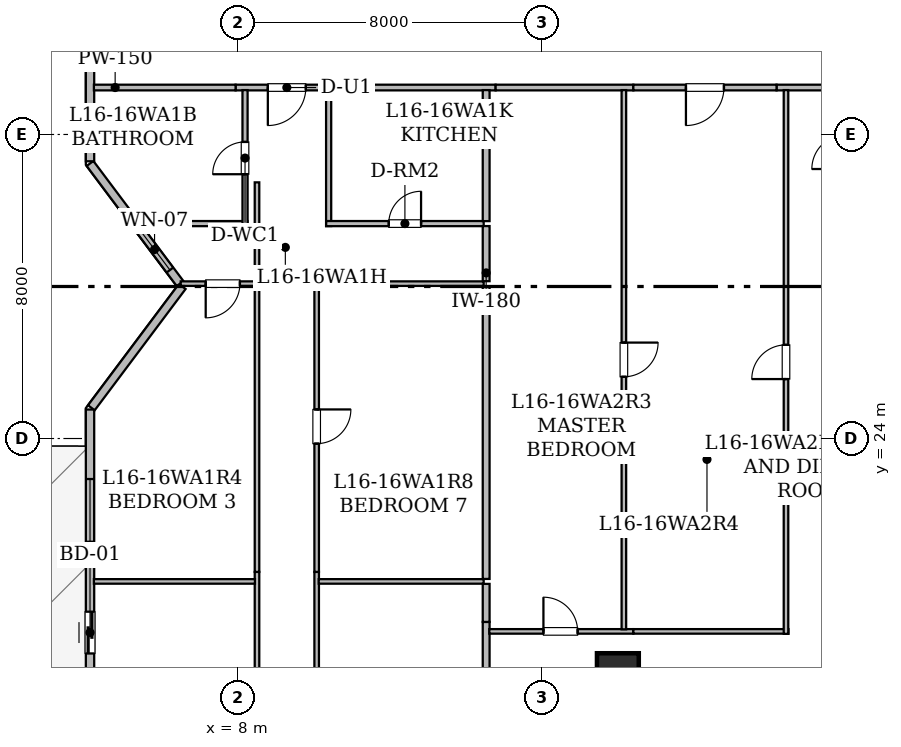
"""IFC4 building model, lengths in metres.
Left out: names, types, materials, properties, quantities, classifications, styles, units other than length and angle.
Written with IfcOpenShell. Run it as: python <this file> out.ifc"""

import sys

from ifc_helpers import new_model, si_unit, direction, frame, frame_2d, origin, origin_2d, place, context, subcontext, project, spatial, rectangle, hollow_rectangle, extrude, element, fill, save


model = new_model("IFC4")
c1 = context("Model", 3, precision=1e-05, world=origin(), true_north=direction((0.0, 1.0)))
c2 = subcontext(c1, "Body", "Model", "MODEL_VIEW")
j1 = project(units=[si_unit("LENGTHUNIT", "METRE"), si_unit("PLANEANGLEUNIT", "RADIAN")], contexts=[c1])
p1 = place(None, origin())
s1 = spatial("IfcSite", under=j1, at=p1, CompositionType="ELEMENT")
p2 = place(p1, origin())
s2 = spatial("IfcBuilding", under=s1, at=p2, CompositionType="ELEMENT")
p3 = place(p2, frame((0.0, 0.0, 66.15)))
s3 = spatial("IfcBuildingStorey", under=s2, at=p3, CompositionType="ELEMENT", Elevation=66.15)
p4 = place(p3, frame((18.0, 17.8, 0.0), z_axis=(0.0, 0.0, 1.0), x_axis=(1.0, 0.0, 0.0)))
e1 = element("IfcColumn", 1, at=p4, inside=s3, PredefinedType="COLUMN", context=c2, shape_type="SweptSolid", body=[
    extrude(hollow_rectangle(XDim=1.1, YDim=1.1, WallThickness=0.055, at=origin_2d()), origin(), (0.0, 0.0, 1.0), 3.65),
])
p5 = place(p3, frame((4.11, 7.317, 0.0), z_axis=(0.0, 0.0, 1.0), x_axis=(0.0, 1.0, 0.0)))
e2 = element("IfcWall", 2, at=p5, inside=s3, PredefinedType="STANDARD", context=c2, shape_type="SweptSolid", body=[
    extrude(rectangle(XDim=17.446, YDim=0.22, at=frame_2d((8.723, 0.0))), origin(), (0.0, 0.0, 1.0), 3.43),
])
p6 = place(p5, frame((11.027, 0.0, 0.0)))
e3 = element("IfcOpeningElement", 3, at=p6, cuts=e2, PredefinedType="OPENING", context=c2, shape_type="SweptSolid", body=[
    extrude(rectangle(XDim=1.1, YDim=2.2, at=frame_2d((0.55, 1.1))), frame((0.0, 0.12, 0.0), z_axis=(0.0, -1.0, 0.0), x_axis=(1.0, 0.0, 0.0)), (0.0, 0.0, 1.0), 0.24),
])
p7 = place(p5, frame((2.659, 0.0, 0.85)))
e4 = element("IfcOpeningElement", 4, at=p7, cuts=e2, PredefinedType="OPENING", context=c2, shape_type="SweptSolid", body=[
    extrude(rectangle(XDim=1.65, YDim=1.55, at=frame_2d((0.825, 0.775))), frame((0.0, 0.12, 0.0), z_axis=(0.0, -1.0, 0.0), x_axis=(1.0, 0.0, 0.0)), (0.0, 0.0, 1.0), 0.24),
])
p8 = place(p5, frame((13.967, 0.0, 0.85)))
e5 = element("IfcOpeningElement", 5, at=p8, cuts=e2, PredefinedType="OPENING", context=c2, shape_type="SweptSolid", body=[
    extrude(rectangle(XDim=1.65, YDim=1.55, at=frame_2d((0.825, 0.775))), frame((0.0, 0.12, 0.0), z_axis=(0.0, -1.0, 0.0), x_axis=(1.0, 0.0, 0.0)), (0.0, 0.0, 1.0), 0.24),
])
p9 = place(p3, frame((4.145, 24.809, 0.0), z_axis=(0.0, 0.0, 1.0), x_axis=(0.599823674734, 0.800132213592, 0.0)))
e6 = element("IfcWall", 6, at=p9, inside=s3, PredefinedType="STANDARD", context=c2, shape_type="SweptSolid", body=[
    extrude(rectangle(XDim=3.988, YDim=0.22, at=frame_2d((1.994, 0.0))), origin(), (0.0, 0.0, 1.0), 3.43),
])
p10 = place(p3, frame((6.48, 28.077, 0.0), z_axis=(0.0, 0.0, 1.0), x_axis=(-0.599960442794, 0.800029666377, 0.0)))
e7 = element("IfcWall", 7, at=p10, inside=s3, PredefinedType="STANDARD", context=c2, shape_type="SweptSolid", body=[
    extrude(rectangle(XDim=3.95, YDim=0.22, at=frame_2d((1.975, 0.0))), origin(), (0.0, 0.0, 1.0), 3.43),
])
p11 = place(p10, frame((0.445, 0.0, 0.85)))
e8 = element("IfcOpeningElement", 8, at=p11, cuts=e7, PredefinedType="OPENING", context=c2, shape_type="SweptSolid", body=[
    extrude(rectangle(XDim=1.35, YDim=1.5, at=frame_2d((0.675, 0.75))), frame((0.0, 0.12, 0.0), z_axis=(0.0, -1.0, 0.0), x_axis=(1.0, 0.0, 0.0)), (0.0, 0.0, 1.0), 0.24),
])
p12 = place(p3, frame((4.11, 31.295, 0.0), z_axis=(0.0, 0.0, 1.0), x_axis=(0.0, 1.0, 0.0)))
e9 = element("IfcWall", 9, at=p12, inside=s3, PredefinedType="STANDARD", context=c2, shape_type="SweptSolid", body=[
    extrude(rectangle(XDim=17.459, YDim=0.22, at=frame_2d((8.729, 0.0))), origin(), (0.0, 0.0, 1.0), 3.43),
])
p13 = place(p12, frame((8.165, 0.0, 0.85)))
e10 = element("IfcOpeningElement", 10, at=p13, cuts=e9, PredefinedType="OPENING", context=c2, shape_type="SweptSolid", body=[
    extrude(rectangle(XDim=1.65, YDim=1.55, at=frame_2d((0.825, 0.775))), frame((0.0, 0.12, 0.0), z_axis=(0.0, -1.0, 0.0), x_axis=(1.0, 0.0, 0.0)), (0.0, 0.0, 1.0), 0.24),
])
p14 = place(p12, frame((12.024, 0.0, 0.85)))
e11 = element("IfcOpeningElement", 11, at=p14, cuts=e9, PredefinedType="OPENING", context=c2, shape_type="SweptSolid", body=[
    extrude(rectangle(XDim=1.65, YDim=1.55, at=frame_2d((0.825, 0.775))), frame((0.0, 0.12, 0.0), z_axis=(0.0, -1.0, 0.0), x_axis=(1.0, 0.0, 0.0)), (0.0, 0.0, 1.0), 0.24),
])
p15 = place(p12, frame((15.921, 0.0, 0.85)))
e12 = element("IfcOpeningElement", 12, at=p15, cuts=e9, PredefinedType="OPENING", context=c2, shape_type="SweptSolid", body=[
    extrude(rectangle(XDim=1.35, YDim=1.5, at=frame_2d((0.675, 0.75))), frame((0.0, 0.12, 0.0), z_axis=(0.0, -1.0, 0.0), x_axis=(1.0, 0.0, 0.0)), (0.0, 0.0, 1.0), 0.24),
])
p16 = place(p3, frame((10.638, 33.235, 0.0), z_axis=(0.0, 0.0, 1.0), x_axis=(-1.0, 0.0, 0.0)))
e13 = element("IfcWall", 13, at=p16, inside=s3, PredefinedType="STANDARD", context=c2, shape_type="SweptSolid", body=[
    extrude(rectangle(XDim=2.698, YDim=0.15, at=frame_2d((1.349, 0.0))), origin(), (0.0, 0.0, 1.0), 3.43),
])
p17 = place(p16, frame((0.849, 0.0, 0.0)))
e14 = element("IfcOpeningElement", 14, at=p17, cuts=e13, PredefinedType="OPENING", context=c2, shape_type="SweptSolid", body=[
    extrude(rectangle(XDim=1.0, YDim=2.15, at=frame_2d((0.5, 1.075))), frame((0.0, 0.085, 0.0), z_axis=(0.0, -1.0, 0.0), x_axis=(1.0, 0.0, 0.0)), (0.0, 0.0, 1.0), 0.17),
])
p18 = place(p3, frame((7.94, 33.235, 0.0), z_axis=(0.0, 0.0, 1.0), x_axis=(-1.0, 0.0, 0.0)))
e15 = element("IfcWall", 15, at=p18, inside=s3, PredefinedType="STANDARD", context=c2, shape_type="SweptSolid", body=[
    extrude(rectangle(XDim=3.728, YDim=0.15, at=frame_2d((1.864, 0.0))), origin(), (0.0, 0.0, 1.0), 2.803),
])
p19 = place(p3, frame((14.783, 33.235, 0.0), z_axis=(0.0, 0.0, 1.0), x_axis=(-1.0, 0.0, 0.0)))
e16 = element("IfcWall", 16, at=p19, inside=s3, PredefinedType="STANDARD", context=c2, shape_type="SweptSolid", body=[
    extrude(rectangle(XDim=4.145, YDim=0.15, at=frame_2d((2.073, 0.0))), origin(), (0.0, 0.0, 1.0), 3.43),
])
p20 = place(p3, frame((23.755, 33.235, 0.0), z_axis=(0.0, 0.0, 1.0), x_axis=(-1.0, 0.0, 0.0)))
e17 = element("IfcWall", 17, at=p20, inside=s3, PredefinedType="STANDARD", context=c2, shape_type="SweptSolid", body=[
    extrude(rectangle(XDim=1.58, YDim=0.15, at=frame_2d((0.79, 0.0))), origin(), (0.0, 0.0, 1.0), 3.43),
])
p21 = place(p3, frame((18.407, 33.235, 0.0), z_axis=(0.0, 0.0, 1.0), x_axis=(-1.0, 0.0, 0.0)))
e18 = element("IfcWall", 18, at=p21, inside=s3, PredefinedType="STANDARD", context=c2, shape_type="SweptSolid", body=[
    extrude(rectangle(XDim=3.624, YDim=0.15, at=frame_2d((1.812, 0.0))), origin(), (0.0, 0.0, 1.0), 2.647),
])
p22 = place(p3, frame((22.175, 33.235, 0.0), z_axis=(0.0, 0.0, 1.0), x_axis=(-1.0, 0.0, 0.0)))
e19 = element("IfcWall", 19, at=p22, inside=s3, PredefinedType="STANDARD", context=c2, shape_type="SweptSolid", body=[
    extrude(rectangle(XDim=3.768, YDim=0.15, at=frame_2d((1.884, 0.0))), origin(), (0.0, 0.0, 1.0), 3.43),
])
p23 = place(p22, frame((1.384, 0.0, 0.0)))
e20 = element("IfcOpeningElement", 20, at=p23, cuts=e19, PredefinedType="OPENING", context=c2, shape_type="SweptSolid", body=[
    extrude(rectangle(XDim=1.0, YDim=2.15, at=frame_2d((0.5, 1.075))), frame((0.0, 0.085, 0.0), z_axis=(0.0, -1.0, 0.0), x_axis=(1.0, 0.0, 0.0)), (0.0, 0.0, 1.0), 0.17),
])
p24 = place(p3, frame((5.408, 29.655, 0.0), z_axis=(0.0, 0.0, 1.0), x_axis=(1.0, 0.0, 0.0)))
e21 = element("IfcWall", 21, at=p24, inside=s3, PredefinedType="PARTITIONING", context=c2, shape_type="SweptSolid", body=[
    extrude(rectangle(XDim=2.846, YDim=0.135, at=frame_2d((1.423, 0.0))), origin(), (0.0, 0.0, 1.0), 2.803),
])
p25 = place(p3, frame((8.189, 29.59, 0.0), z_axis=(0.0, 0.0, 1.0), x_axis=(0.0, 1.0, 0.0)))
e22 = element("IfcWall", 22, at=p25, inside=s3, PredefinedType="PARTITIONING", context=c2, shape_type="SweptSolid", body=[
    extrude(rectangle(XDim=3.578, YDim=0.135, at=frame_2d((1.789, 0.0))), origin(), (0.0, 0.0, 1.0), 3.43),
])
p26 = place(p25, frame((1.364, 0.0, 0.0)))
e23 = element("IfcOpeningElement", 23, at=p26, cuts=e22, PredefinedType="OPENING", context=c2, shape_type="SweptSolid", body=[
    extrude(rectangle(XDim=0.85, YDim=2.1, at=frame_2d((0.425, 1.05))), frame((0.0, 0.077, 0.0), z_axis=(0.0, -1.0, 0.0), x_axis=(1.0, 0.0, 0.0)), (0.0, 0.0, 1.0), 0.155),
])
p27 = place(p3, frame((10.389, 33.168, 0.0), z_axis=(0.0, 0.0, 1.0), x_axis=(0.0, -1.0, 0.0)))
e24 = element("IfcWall", 24, at=p27, inside=s3, PredefinedType="PARTITIONING", context=c2, shape_type="SweptSolid", body=[
    extrude(rectangle(XDim=3.578, YDim=0.135, at=frame_2d((1.789, 0.0))), origin(), (0.0, 0.0, 1.0), 3.43),
])
p28 = place(p3, frame((10.324, 29.655, 0.0), z_axis=(0.0, 0.0, 1.0), x_axis=(1.0, 0.0, 0.0)))
e25 = element("IfcWall", 25, at=p28, inside=s3, PredefinedType="PARTITIONING", context=c2, shape_type="SweptSolid", body=[
    extrude(rectangle(XDim=4.145, YDim=0.135, at=frame_2d((2.073, 0.0))), origin(), (0.0, 0.0, 1.0), 3.43),
])
p29 = place(p28, frame((1.647, 0.0, 0.0)))
e26 = element("IfcOpeningElement", 26, at=p29, cuts=e25, PredefinedType="OPENING", context=c2, shape_type="SweptSolid", body=[
    extrude(rectangle(XDim=0.85, YDim=2.1, at=frame_2d((0.425, 1.05))), frame((0.0, 0.077, 0.0), z_axis=(0.0, -1.0, 0.0), x_axis=(1.0, 0.0, 0.0)), (0.0, 0.0, 1.0), 0.155),
])
p30 = place(p3, frame((8.504, 13.75, 0.0), z_axis=(0.0, 0.0, 1.0), x_axis=(0.0, 1.0, 0.0)))
e27 = element("IfcWall", 27, at=p30, inside=s3, PredefinedType="PARTITIONING", context=c2, shape_type="SweptSolid", body=[
    extrude(rectangle(XDim=6.74, YDim=0.12, at=frame_2d((3.37, 0.0))), origin(), (0.0, 0.0, 1.0), 2.647),
])
p31 = place(p30, frame((2.899, 0.0, 0.0)))
e28 = element("IfcOpeningElement", 28, at=p31, cuts=e27, PredefinedType="OPENING", context=c2, shape_type="SweptSolid", body=[
    extrude(rectangle(XDim=0.9, YDim=2.1, at=frame_2d((0.45, 1.05))), frame((0.0, 0.07, 0.0), z_axis=(0.0, -1.0, 0.0), x_axis=(1.0, 0.0, 0.0)), (0.0, 0.0, 1.0), 0.14),
])
p32 = place(p3, frame((8.504, 20.49, 0.0), z_axis=(0.0, 0.0, 1.0), x_axis=(0.0, 1.0, 0.0)))
e29 = element("IfcWall", 29, at=p32, inside=s3, PredefinedType="PARTITIONING", context=c2, shape_type="SweptSolid", body=[
    extrude(rectangle(XDim=10.25, YDim=0.12, at=frame_2d((5.125, 0.0))), origin(), (0.0, 0.0, 1.0), 3.065),
])
p33 = place(p3, frame((11.169, 28.075, 0.0), z_axis=(0.0, 0.0, 1.0), x_axis=(-1.0, 0.0, 0.0)))
e30 = element("IfcWall", 30, at=p33, inside=s3, PredefinedType="PARTITIONING", context=c2, shape_type="SweptSolid", body=[
    extrude(rectangle(XDim=4.673, YDim=0.12, at=frame_2d((2.336, 0.0))), origin(), (0.0, 0.0, 1.0), 3.43),
])
p34 = place(p33, frame((3.115, 0.0, 0.0)))
e31 = element("IfcOpeningElement", 31, at=p34, cuts=e30, PredefinedType="OPENING", context=c2, shape_type="SweptSolid", body=[
    extrude(rectangle(XDim=0.9, YDim=2.1, at=frame_2d((0.45, 1.05))), frame((0.0, 0.07, 0.0), z_axis=(0.0, -1.0, 0.0), x_axis=(1.0, 0.0, 0.0)), (0.0, 0.0, 1.0), 0.14),
])
p35 = place(p3, frame((10.074, 20.49, 0.0), z_axis=(0.0, 0.0, 1.0), x_axis=(0.0, -1.0, 0.0)))
e32 = element("IfcWall", 32, at=p35, inside=s3, PredefinedType="PARTITIONING", context=c2, shape_type="SweptSolid", body=[
    extrude(rectangle(XDim=6.74, YDim=0.12, at=frame_2d((3.37, 0.0))), origin(), (0.0, 0.0, 1.0), 2.647),
])
p36 = place(p35, frame((2.942, 0.0, 0.0)))
e33 = element("IfcOpeningElement", 33, at=p36, cuts=e32, PredefinedType="OPENING", context=c2, shape_type="SweptSolid", body=[
    extrude(rectangle(XDim=0.9, YDim=2.1, at=frame_2d((0.45, 1.05))), frame((0.0, 0.07, 0.0), z_axis=(0.0, -1.0, 0.0), x_axis=(1.0, 0.0, 0.0)), (0.0, 0.0, 1.0), 0.14),
])
p37 = place(p3, frame((14.469, 28.075, 0.0), z_axis=(0.0, 0.0, 1.0), x_axis=(-1.0, 0.0, 0.0)))
e34 = element("IfcWall", 34, at=p37, inside=s3, PredefinedType="PARTITIONING", context=c2, shape_type="SweptSolid", body=[
    extrude(rectangle(XDim=3.3, YDim=0.12, at=frame_2d((1.65, 0.0))), origin(), (0.0, 0.0, 1.0), 3.43),
])
p38 = place(p3, frame((10.074, 28.14, 0.0), z_axis=(0.0, 0.0, 1.0), x_axis=(0.0, -1.0, 0.0)))
e35 = element("IfcWall", 35, at=p38, inside=s3, PredefinedType="PARTITIONING", context=c2, shape_type="SweptSolid", body=[
    extrude(rectangle(XDim=7.65, YDim=0.12, at=frame_2d((3.825, 0.0))), origin(), (0.0, 0.0, 1.0), 3.065),
])
p39 = place(p38, frame((3.375, 0.0, 0.0)))
e36 = element("IfcOpeningElement", 36, at=p39, cuts=e35, PredefinedType="OPENING", context=c2, shape_type="SweptSolid", body=[
    extrude(rectangle(XDim=0.9, YDim=2.1, at=frame_2d((0.45, 1.05))), frame((0.0, 0.07, 0.0), z_axis=(0.0, -1.0, 0.0), x_axis=(1.0, 0.0, 0.0)), (0.0, 0.0, 1.0), 0.14),
])
p40 = place(p3, frame((14.534, 29.59, 0.0), z_axis=(0.0, 0.0, 1.0), x_axis=(0.0, -1.0, 0.0)))
e37 = element("IfcWall", 37, at=p40, inside=s3, PredefinedType="STANDARD", context=c2, shape_type="SweptSolid", body=[
    extrude(rectangle(XDim=1.45, YDim=0.18, at=frame_2d((0.725, 0.0))), origin(), (0.0, 0.0, 1.0), 3.43),
])
p41 = place(p3, frame((14.534, 33.168, 0.0), z_axis=(0.0, 0.0, 1.0), x_axis=(0.0, -1.0, 0.0)))
e38 = element("IfcWall", 38, at=p41, inside=s3, PredefinedType="STANDARD", context=c2, shape_type="SweptSolid", body=[
    extrude(rectangle(XDim=3.448, YDim=0.18, at=frame_2d((1.724, 0.0))), origin(), (0.0, 0.0, 1.0), 3.43),
])
p42 = place(p3, frame((4.212, 20.24, 0.0), z_axis=(0.0, 0.0, 1.0), x_axis=(1.0, 0.0, 0.0)))
e39 = element("IfcWall", 39, at=p42, inside=s3, PredefinedType="PARTITIONING", context=c2, shape_type="SweptSolid", body=[
    extrude(rectangle(XDim=4.238, YDim=0.12, at=frame_2d((2.119, 0.0))), origin(), (0.0, 0.0, 1.0), 2.803),
])
p43 = place(p3, frame((10.128, 20.24, 0.0), z_axis=(0.0, 0.0, 1.0), x_axis=(1.0, 0.0, 0.0)))
e40 = element("IfcWall", 40, at=p43, inside=s3, PredefinedType="PARTITIONING", context=c2, shape_type="SweptSolid", body=[
    extrude(rectangle(XDim=4.341, YDim=0.12, at=frame_2d((2.17, 0.0))), origin(), (0.0, 0.0, 1.0), 3.43),
])
p44 = place(p3, frame((14.534, 19.174, 0.0), z_axis=(0.0, 0.0, 1.0), x_axis=(0.0, -1.0, 0.0)))
e41 = element("IfcWall", 41, at=p44, inside=s3, PredefinedType="STANDARD", context=c2, shape_type="SweptSolid", body=[
    extrude(rectangle(XDim=2.068, YDim=0.18, at=frame_2d((1.034, 0.0))), origin(), (0.0, 0.0, 1.0), 2.647),
])
p45 = place(p3, frame((14.534, 20.175, 0.0), z_axis=(0.0, 0.0, 1.0), x_axis=(0.0, -1.0, 0.0)))
e42 = element("IfcWall", 42, at=p45, inside=s3, PredefinedType="STANDARD", context=c2, shape_type="SweptSolid", body=[
    extrude(rectangle(XDim=1.001, YDim=0.18, at=frame_2d((0.5, 0.0))), origin(), (0.0, 0.0, 1.0), 3.43),
])
p46 = place(p3, frame((14.534, 28.01, 0.0), z_axis=(0.0, 0.0, 1.0), x_axis=(0.0, -1.0, 0.0)))
e43 = element("IfcWall", 43, at=p46, inside=s3, PredefinedType="STANDARD", context=c2, shape_type="SweptSolid", body=[
    extrude(rectangle(XDim=7.705, YDim=0.18, at=frame_2d((3.853, 0.0))), origin(), (0.0, 0.0, 1.0), 3.065),
])
p47 = place(p3, frame((14.616, 18.925, 0.0), z_axis=(0.0, 0.0, 1.0), x_axis=(1.0, 0.0, 0.0)))
e44 = element("IfcWall", 44, at=p47, inside=s3, PredefinedType="PARTITIONING", context=c2, shape_type="SweptSolid", body=[
    extrude(rectangle(XDim=3.791, YDim=0.12, at=frame_2d((1.896, 0.0))), origin(), (0.0, 0.0, 1.0), 2.647),
])
p48 = place(p47, frame((1.425, 0.0, 0.0)))
e45 = element("IfcOpeningElement", 45, at=p48, cuts=e44, PredefinedType="OPENING", context=c2, shape_type="SweptSolid", body=[
    extrude(rectangle(XDim=0.9, YDim=2.1, at=frame_2d((0.45, 1.05))), frame((0.0, 0.07, 0.0), z_axis=(0.0, -1.0, 0.0), x_axis=(1.0, 0.0, 0.0)), (0.0, 0.0, 1.0), 0.14),
])
p49 = place(p3, frame((18.407, 18.925, 0.0), z_axis=(0.0, 0.0, 1.0), x_axis=(1.0, 0.0, 0.0)))
e46 = element("IfcWall", 46, at=p49, inside=s3, PredefinedType="PARTITIONING", context=c2, shape_type="SweptSolid", body=[
    extrude(rectangle(XDim=4.082, YDim=0.12, at=frame_2d((2.041, 0.0))), origin(), (0.0, 0.0, 1.0), 3.43),
])
p50 = place(p3, frame((22.424, 18.86, 0.0), z_axis=(0.0, 0.0, 1.0), x_axis=(0.0, 1.0, 0.0)))
e47 = element("IfcWall", 47, at=p50, inside=s3, PredefinedType="PARTITIONING", context=c2, shape_type="SweptSolid", body=[
    extrude(rectangle(XDim=14.308, YDim=0.12, at=frame_2d((7.154, 0.0))), origin(), (0.0, 0.0, 1.0), 3.065),
])
p51 = place(p50, frame((6.704, 0.0, 0.0)))
e48 = element("IfcOpeningElement", 48, at=p51, cuts=e47, PredefinedType="OPENING", context=c2, shape_type="SweptSolid", body=[
    extrude(rectangle(XDim=0.9, YDim=2.1, at=frame_2d((0.45, 1.05))), frame((0.0, 0.07, 0.0), z_axis=(0.0, -1.0, 0.0), x_axis=(1.0, 0.0, 0.0)), (0.0, 0.0, 1.0), 0.14),
])
p52 = place(p3, frame((18.158, 33.168, 0.0), z_axis=(0.0, 0.0, 1.0), x_axis=(0.0, -1.0, 0.0)))
e49 = element("IfcWall", 49, at=p52, inside=s3, PredefinedType="PARTITIONING", context=c2, shape_type="SweptSolid", body=[
    extrude(rectangle(XDim=14.189, YDim=0.12, at=frame_2d((7.094, 0.0))), origin(), (0.0, 0.0, 1.0), 2.647),
])
p53 = place(p52, frame((6.644, 0.0, 0.0)))
e50 = element("IfcOpeningElement", 50, at=p53, cuts=e49, PredefinedType="OPENING", context=c2, shape_type="SweptSolid", body=[
    extrude(rectangle(XDim=0.9, YDim=2.1, at=frame_2d((0.45, 1.05))), frame((0.0, 0.07, 0.0), z_axis=(0.0, -1.0, 0.0), x_axis=(1.0, 0.0, 0.0)), (0.0, 0.0, 1.0), 0.14),
])
p54 = place(p6, origin())
e51 = element("IfcDoor", 51, at=p54, inside=s3, OperationType="SLIDING_TO_LEFT", PredefinedType="DOOR", context=c2, shape_type="SweptSolid", body=[
    extrude(rectangle(XDim=1.1, YDim=2.2, at=frame_2d((0.55, 1.1))), frame((0.0, 0.025, 0.0), z_axis=(0.0, -1.0, 0.0), x_axis=(1.0, 0.0, 0.0)), (0.0, 0.0, 1.0), 0.05),
])
fill(e3, e51)
p55 = place(p11, origin())
e52 = element("IfcWindow", 52, at=p55, inside=s3, PartitioningType="SINGLE_PANEL", PredefinedType="WINDOW", context=c2, shape_type="SweptSolid", body=[
    extrude(rectangle(XDim=1.35, YDim=1.5, at=frame_2d((0.675, 0.75))), frame((0.0, 0.03, 0.0), z_axis=(0.0, -1.0, 0.0), x_axis=(1.0, 0.0, 0.0)), (0.0, 0.0, 1.0), 0.06),
])
fill(e8, e52)
p56 = place(p8, origin())
e53 = element("IfcWindow", 53, at=p56, inside=s3, PartitioningType="SINGLE_PANEL", PredefinedType="WINDOW", context=c2, shape_type="SweptSolid", body=[
    extrude(rectangle(XDim=1.65, YDim=1.55, at=frame_2d((0.825, 0.775))), frame((0.0, 0.03, 0.0), z_axis=(0.0, -1.0, 0.0), x_axis=(1.0, 0.0, 0.0)), (0.0, 0.0, 1.0), 0.06),
])
fill(e5, e53)
p57 = place(p17, origin())
e54 = element("IfcDoor", 54, at=p57, inside=s3, OperationType="SINGLE_SWING_RIGHT", PredefinedType="DOOR", context=c2, shape_type="SweptSolid", body=[
    extrude(rectangle(XDim=1.0, YDim=2.15, at=frame_2d((0.5, 1.075))), frame((0.0, 0.025, 0.0), z_axis=(0.0, -1.0, 0.0), x_axis=(1.0, 0.0, 0.0)), (0.0, 0.0, 1.0), 0.05),
])
fill(e14, e54)
p58 = place(p23, origin())
e55 = element("IfcDoor", 55, at=p58, inside=s3, OperationType="SINGLE_SWING_RIGHT", PredefinedType="DOOR", context=c2, shape_type="SweptSolid", body=[
    extrude(rectangle(XDim=1.0, YDim=2.15, at=frame_2d((0.5, 1.075))), frame((0.0, 0.025, 0.0), z_axis=(0.0, -1.0, 0.0), x_axis=(1.0, 0.0, 0.0)), (0.0, 0.0, 1.0), 0.05),
])
fill(e20, e55)
p59 = place(p26, origin())
e56 = element("IfcDoor", 56, at=p59, inside=s3, OperationType="SINGLE_SWING_LEFT", PredefinedType="DOOR", context=c2, shape_type="SweptSolid", body=[
    extrude(rectangle(XDim=0.85, YDim=2.1, at=frame_2d((0.425, 1.05))), frame((0.0, 0.025, 0.0), z_axis=(0.0, -1.0, 0.0), x_axis=(1.0, 0.0, 0.0)), (0.0, 0.0, 1.0), 0.05),
])
fill(e23, e56)
p60 = place(p29, origin())
e57 = element("IfcDoor", 57, at=p60, inside=s3, OperationType="SINGLE_SWING_RIGHT", PredefinedType="DOOR", context=c2, shape_type="SweptSolid", body=[
    extrude(rectangle(XDim=0.85, YDim=2.1, at=frame_2d((0.425, 1.05))), frame((0.0, 0.025, 0.0), z_axis=(0.0, -1.0, 0.0), x_axis=(1.0, 0.0, 0.0)), (0.0, 0.0, 1.0), 0.05),
])
fill(e26, e57)
p61 = place(p34, origin())
e58 = element("IfcDoor", 58, at=p61, inside=s3, OperationType="SINGLE_SWING_RIGHT", PredefinedType="DOOR", context=c2, shape_type="SweptSolid", body=[
    extrude(rectangle(XDim=0.9, YDim=2.1, at=frame_2d((0.45, 1.05))), frame((0.0, 0.025, 0.0), z_axis=(0.0, -1.0, 0.0), x_axis=(1.0, 0.0, 0.0)), (0.0, 0.0, 1.0), 0.05),
])
fill(e31, e58)
p62 = place(p39, origin())
e59 = element("IfcDoor", 59, at=p62, inside=s3, OperationType="SINGLE_SWING_LEFT", PredefinedType="DOOR", context=c2, shape_type="SweptSolid", body=[
    extrude(rectangle(XDim=0.9, YDim=2.1, at=frame_2d((0.45, 1.05))), frame((0.0, 0.025, 0.0), z_axis=(0.0, -1.0, 0.0), x_axis=(1.0, 0.0, 0.0)), (0.0, 0.0, 1.0), 0.05),
])
fill(e36, e59)
p63 = place(p48, origin())
e60 = element("IfcDoor", 60, at=p63, inside=s3, OperationType="SINGLE_SWING_LEFT", PredefinedType="DOOR", context=c2, shape_type="SweptSolid", body=[
    extrude(rectangle(XDim=0.9, YDim=2.1, at=frame_2d((0.45, 1.05))), frame((0.0, 0.025, 0.0), z_axis=(0.0, -1.0, 0.0), x_axis=(1.0, 0.0, 0.0)), (0.0, 0.0, 1.0), 0.05),
])
fill(e45, e60)
p64 = place(p51, origin())
e61 = element("IfcDoor", 61, at=p64, inside=s3, OperationType="SINGLE_SWING_LEFT", PredefinedType="DOOR", context=c2, shape_type="SweptSolid", body=[
    extrude(rectangle(XDim=0.9, YDim=2.1, at=frame_2d((0.45, 1.05))), frame((0.0, 0.025, 0.0), z_axis=(0.0, -1.0, 0.0), x_axis=(1.0, 0.0, 0.0)), (0.0, 0.0, 1.0), 0.05),
])
fill(e48, e61)
p65 = place(p53, origin())
e62 = element("IfcDoor", 62, at=p65, inside=s3, OperationType="SINGLE_SWING_LEFT", PredefinedType="DOOR", context=c2, shape_type="SweptSolid", body=[
    extrude(rectangle(XDim=0.9, YDim=2.1, at=frame_2d((0.45, 1.05))), frame((0.0, 0.025, 0.0), z_axis=(0.0, -1.0, 0.0), x_axis=(1.0, 0.0, 0.0)), (0.0, 0.0, 1.0), 0.05),
])
fill(e50, e62)
save(model, sys.argv[1])
